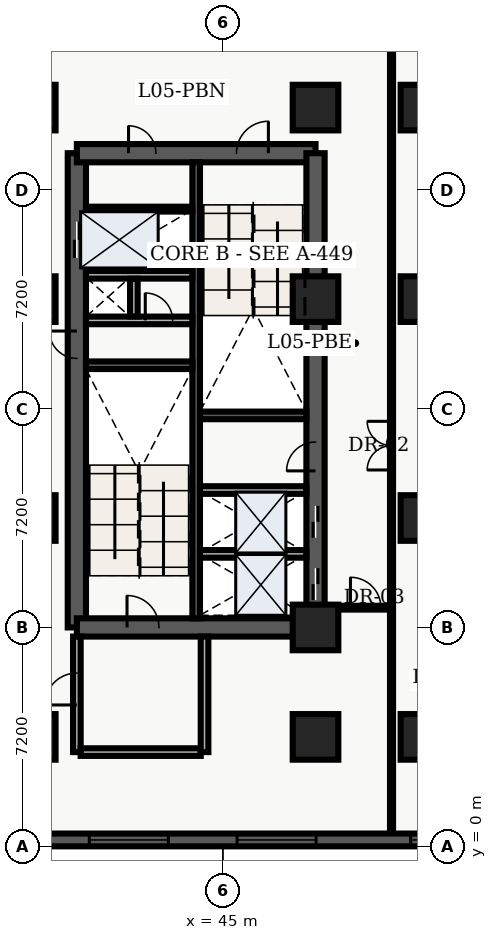
"""IFC4 building model, lengths in metres.
Left out: names, types, materials, properties, quantities, classifications, styles, units other than length and angle.
Written with IfcOpenShell. Run it as: python <this file> out.ifc"""

import sys

from ifc_helpers import new_model, entity, si_unit, converted_unit, direction, frame, origin_with_axes, origin_2d_with_axis, place, context, subcontext, project, spatial, polyline, rectangle, outline, extrude, element, fill, save


model = new_model("IFC4")
c1 = context("Model", 3, precision=1e-05, world=origin_with_axes(), true_north=direction((0.0, 1.0)))
c2 = subcontext(c1, "Body", "Model", "MODEL_VIEW")
j1 = project(units=[si_unit("LENGTHUNIT", "METRE"), converted_unit("PLANEANGLEUNIT", "DEGREE", entity("IfcPlaneAngleMeasure", 0.017), si_unit("PLANEANGLEUNIT", "RADIAN"), dimensions=[0, 0, 0, 0, 0, 0, 0])], contexts=[c1])
p1 = place(None, origin_with_axes())
s1 = spatial("IfcSite", under=j1, at=p1, CompositionType="ELEMENT")
p2 = place(p1, origin_with_axes())
s2 = spatial("IfcBuilding", under=s1, at=p2, CompositionType="ELEMENT")
p3 = place(p2, frame((0.0, 0.0, 24.3), z_axis=(0.0, 0.0, 1.0), x_axis=(1.0, 0.0, 0.0)))
s3 = spatial("IfcBuildingStorey", under=s2, at=p3, CompositionType="ELEMENT", Elevation=24.3)
p4 = place(p3, frame((40.2, 7.2, 0.0), z_axis=(0.0, 0.0, 1.0), x_axis=(0.0, 1.0, 0.0)))
e1 = element("IfcWall", 1, at=p4, inside=s3, PredefinedType="SHEAR", context=c2, shape_type="SweptSolid", body=[
    extrude(outline(polyline([(0.0, -0.3), (15.6, -0.3), (15.6, 0.3), (0.0, 0.3), (0.0, -0.3)])), origin_with_axes(), (0.0, 0.0, 1.0), 4.2),
])
p5 = place(p4, frame((12.75, 0.0, 0.0), z_axis=(0.0, 0.0, 1.0), x_axis=(1.0, 0.0, 0.0)))
e2 = element("IfcOpeningElement", 2, at=p5, cuts=e1, PredefinedType="OPENING", context=c2, shape_type="SweptSolid", body=[
    extrude(rectangle(XDim=1.2, YDim=0.62, at=origin_2d_with_axis()), origin_with_axes(), (0.0, 0.0, 1.0), 2.15),
])
p6 = place(p4, frame((9.3, 0.0, 0.0), z_axis=(0.0, 0.0, 1.0), x_axis=(1.0, 0.0, 0.0)))
e3 = element("IfcOpeningElement", 3, at=p6, cuts=e1, PredefinedType="OPENING", context=c2, shape_type="SweptSolid", body=[
    extrude(rectangle(XDim=0.9, YDim=0.62, at=origin_2d_with_axis()), origin_with_axes(), (0.0, 0.0, 1.0), 2.15),
])
p7 = place(p3, frame((40.2, 7.2, 0.0), z_axis=(0.0, 0.0, 1.0), x_axis=(1.0, 0.0, 0.0)))
e4 = element("IfcWall", 4, at=p7, inside=s3, PredefinedType="SHEAR", context=c2, shape_type="SweptSolid", body=[
    extrude(outline(polyline([(0.0, -0.3), (7.85, -0.3), (7.85, 0.3), (0.0, 0.3), (0.0, -0.3)])), origin_with_axes(), (0.0, 0.0, 1.0), 4.2),
])
p8 = place(p7, frame((2.175, 0.0, 0.0), z_axis=(0.0, 0.0, 1.0), x_axis=(1.0, 0.0, 0.0)))
e5 = element("IfcOpeningElement", 5, at=p8, cuts=e4, PredefinedType="OPENING", context=c2, shape_type="SweptSolid", body=[
    extrude(rectangle(XDim=1.05, YDim=0.62, at=origin_2d_with_axis()), origin_with_axes(), (0.0, 0.0, 1.0), 2.15),
])
p9 = place(p3, frame((40.2, 22.8, 0.0), z_axis=(0.0, 0.0, 1.0), x_axis=(1.0, 0.0, 0.0)))
e6 = element("IfcWall", 6, at=p9, inside=s3, PredefinedType="SHEAR", context=c2, shape_type="SweptSolid", body=[
    extrude(outline(polyline([(0.0, -0.3), (7.85, -0.3), (7.85, 0.3), (0.0, 0.3), (0.0, -0.3)])), origin_with_axes(), (0.0, 0.0, 1.0), 4.2),
])
p10 = place(p9, frame((5.775, 0.0, 0.0), z_axis=(0.0, 0.0, 1.0), x_axis=(1.0, 0.0, 0.0)))
e7 = element("IfcOpeningElement", 7, at=p10, cuts=e6, PredefinedType="OPENING", context=c2, shape_type="SweptSolid", body=[
    extrude(rectangle(XDim=1.05, YDim=0.62, at=origin_2d_with_axis()), origin_with_axes(), (0.0, 0.0, 1.0), 2.15),
])
p11 = place(p9, frame((2.15, 0.0, 0.0), z_axis=(0.0, 0.0, 1.0), x_axis=(1.0, 0.0, 0.0)))
e8 = element("IfcOpeningElement", 8, at=p11, cuts=e6, PredefinedType="OPENING", context=c2, shape_type="SweptSolid", body=[
    extrude(rectangle(XDim=0.9, YDim=0.62, at=origin_2d_with_axis()), origin_with_axes(), (0.0, 0.0, 1.0), 2.15),
])
p12 = place(p3, frame((48.05, 7.2, 0.0), z_axis=(0.0, 0.0, 1.0), x_axis=(0.0, 1.0, 0.0)))
e9 = element("IfcWall", 9, at=p12, inside=s3, PredefinedType="SHEAR", context=c2, shape_type="SweptSolid", body=[
    extrude(outline(polyline([(0.0, -0.3), (15.6, -0.3), (15.6, 0.3), (0.0, 0.3), (0.0, -0.3)])), origin_with_axes(), (0.0, 0.0, 1.0), 4.2),
])
p13 = place(p12, frame((1.425, 0.0, 0.0), z_axis=(0.0, 0.0, 1.0), x_axis=(1.0, 0.0, 0.0)))
e10 = element("IfcOpeningElement", 10, at=p13, cuts=e9, PredefinedType="OPENING", context=c2, shape_type="SweptSolid", body=[
    extrude(rectangle(XDim=1.05, YDim=0.62, at=origin_2d_with_axis()), origin_with_axes(), (0.0, 0.0, 1.0), 2.15),
])
p14 = place(p12, frame((3.475, 0.0, 0.0), z_axis=(0.0, 0.0, 1.0), x_axis=(1.0, 0.0, 0.0)))
e11 = element("IfcOpeningElement", 11, at=p14, cuts=e9, PredefinedType="OPENING", context=c2, shape_type="SweptSolid", body=[
    extrude(rectangle(XDim=1.05, YDim=0.62, at=origin_2d_with_axis()), origin_with_axes(), (0.0, 0.0, 1.0), 2.15),
])
p15 = place(p12, frame((5.625, 0.0, 0.0), z_axis=(0.0, 0.0, 1.0), x_axis=(1.0, 0.0, 0.0)))
e12 = element("IfcOpeningElement", 12, at=p15, cuts=e9, PredefinedType="OPENING", context=c2, shape_type="SweptSolid", body=[
    extrude(rectangle(XDim=0.95, YDim=0.62, at=origin_2d_with_axis()), origin_with_axes(), (0.0, 0.0, 1.0), 2.15),
])
p16 = place(p3, frame((44.125, 7.5, 0.0), z_axis=(0.0, 0.0, 1.0), x_axis=(0.0, 1.0, 0.0)))
e13 = element("IfcWall", 13, at=p16, inside=s3, PredefinedType="SHEAR", context=c2, shape_type="SweptSolid", body=[
    extrude(outline(polyline([(0.0, -0.125), (15.0, -0.125), (15.0, 0.125), (0.0, 0.125), (0.0, -0.125)])), origin_with_axes(), (0.0, 0.0, 1.0), 4.2),
])
for number, where, z_axis, x_axis in (
    (14, (40.5, 15.825, 0.0), (0.0, 0.0, 1.0), (1.0, 0.0, 0.0)),
    (15, (44.25, 14.175, 0.0), (0.0, 0.0, 1.0), (1.0, 0.0, 0.0)),
):
    element("IfcWall", number, at=place(p3, frame(where, z_axis=z_axis, x_axis=x_axis)), inside=s3, PredefinedType="SHEAR", context=c2, shape_type="SweptSolid", body=[
        extrude(outline(polyline([(0.0, -0.125), (3.5, -0.125), (3.5, 0.125), (0.0, 0.125), (0.0, -0.125)])), origin_with_axes(), (0.0, 0.0, 1.0), 4.2),
    ])
p17 = place(p3, frame((40.5, 17.3, 0.0), z_axis=(0.0, 0.0, 1.0), x_axis=(1.0, 0.0, 0.0)))
e16 = element("IfcWall", 16, at=p17, inside=s3, PredefinedType="SOLIDWALL", context=c2, shape_type="SweptSolid", body=[
    extrude(outline(polyline([(0.0, -0.125), (3.5, -0.125), (3.5, 0.125), (0.0, 0.125), (0.0, -0.125)])), origin_with_axes(), (0.0, 0.0, 1.0), 3.24),
])
p18 = place(p17, frame((2.4, 0.0, 0.0), z_axis=(0.0, 0.0, 1.0), x_axis=(1.0, 0.0, 0.0)))
e17 = element("IfcOpeningElement", 17, at=p18, cuts=e16, PredefinedType="OPENING", context=c2, shape_type="SweptSolid", body=[
    extrude(rectangle(XDim=0.9, YDim=0.27, at=origin_2d_with_axis()), origin_with_axes(), (0.0, 0.0, 1.0), 2.15),
])
p19 = place(p3, frame((40.5, 18.8, 0.0), z_axis=(0.0, 0.0, 1.0), x_axis=(1.0, 0.0, 0.0)))
e18 = element("IfcWall", 18, at=p19, inside=s3, PredefinedType="SOLIDWALL", context=c2, shape_type="SweptSolid", body=[
    extrude(outline(polyline([(0.0, -0.125), (3.5, -0.125), (3.5, 0.125), (0.0, 0.125), (0.0, -0.125)])), origin_with_axes(), (0.0, 0.0, 1.0), 3.24),
])
p20 = place(p3, frame((42.075, 17.43, 0.0), z_axis=(0.0, 0.0, 1.0), x_axis=(0.0, 1.0, 0.0)))
e19 = element("IfcWall", 19, at=p20, inside=s3, PredefinedType="SOLIDWALL", context=c2, shape_type="SweptSolid", body=[
    extrude(outline(polyline([(0.0, -0.125), (1.24, -0.125), (1.24, 0.125), (0.0, 0.125), (0.0, -0.125)])), origin_with_axes(), (0.0, 0.0, 1.0), 3.24),
])
p21 = place(p3, frame((40.2, 3.1, 0.0), z_axis=(0.0, 0.0, 1.0), x_axis=(0.0, 1.0, 0.0)))
e20 = element("IfcWall", 20, at=p21, inside=s3, PredefinedType="SOLIDWALL", context=c2, shape_type="SweptSolid", body=[
    extrude(outline(polyline([(0.0, -0.125), (3.8, -0.125), (3.8, 0.125), (0.0, 0.125), (0.0, -0.125)])), origin_with_axes(), (0.0, 0.0, 1.0), 3.24),
])
p22 = place(p21, frame((2.075, 0.0, 0.0), z_axis=(0.0, 0.0, 1.0), x_axis=(1.0, 0.0, 0.0)))
e21 = element("IfcOpeningElement", 21, at=p22, cuts=e20, PredefinedType="OPENING", context=c2, shape_type="SweptSolid", body=[
    extrude(rectangle(XDim=1.05, YDim=0.27, at=origin_2d_with_axis()), origin_with_axes(), (0.0, 0.0, 1.0), 2.15),
])
p23 = place(p3, frame((40.325, 3.1, 0.0), z_axis=(0.0, 0.0, 1.0), x_axis=(1.0, 0.0, 0.0)))
e22 = element("IfcWall", 22, at=p23, inside=s3, PredefinedType="SOLIDWALL", context=c2, shape_type="SweptSolid", body=[
    extrude(outline(polyline([(0.0, -0.125), (3.95, -0.125), (3.95, 0.125), (0.0, 0.125), (0.0, -0.125)])), origin_with_axes(), (0.0, 0.0, 1.0), 3.24),
])
p24 = place(p3, frame((44.4, 3.1, 0.0), z_axis=(0.0, 0.0, 1.0), x_axis=(0.0, 1.0, 0.0)))
e23 = element("IfcWall", 23, at=p24, inside=s3, PredefinedType="SOLIDWALL", context=c2, shape_type="SweptSolid", body=[
    extrude(outline(polyline([(0.0, -0.125), (3.8, -0.125), (3.8, 0.125), (0.0, 0.125), (0.0, -0.125)])), origin_with_axes(), (0.0, 0.0, 1.0), 3.24),
])
for number, where, z_axis, x_axis in (
    (24, (38.75, 3.6, 0.0), (0.0, 0.0, 1.0), (1.0, 0.0, 0.0)),
    (25, (38.75, 10.8, 0.0), (0.0, 0.0, 1.0), (1.0, 0.0, 0.0)),
    (26, (38.75, 18.0, 0.0), (0.0, 0.0, 1.0), (1.0, 0.0, 0.0)),
    (27, (38.75, 24.3, 0.0), (0.0, 0.0, 1.0), (1.0, 0.0, 0.0)),
    (28, (48.05, 3.6, 0.0), (0.0, 0.0, 1.0), (1.0, 0.0, 0.0)),
    (29, (48.05, 7.2, 0.0), (0.0, 0.0, 1.0), (1.0, 0.0, 0.0)),
    (30, (48.05, 18.0, 0.0), (0.0, 0.0, 1.0), (1.0, 0.0, 0.0)),
    (31, (48.05, 24.3, 0.0), (0.0, 0.0, 1.0), (1.0, 0.0, 0.0)),
    (32, (51.6, 3.6, 0.0), (0.0, 0.0, 1.0), (1.0, 0.0, 0.0)),
    (33, (51.6, 10.8, 0.0), (0.0, 0.0, 1.0), (1.0, 0.0, 0.0)),
    (34, (51.6, 18.0, 0.0), (0.0, 0.0, 1.0), (1.0, 0.0, 0.0)),
    (35, (51.6, 24.3, 0.0), (0.0, 0.0, 1.0), (1.0, 0.0, 0.0)),
):
    element("IfcColumn", number, at=place(p3, frame(where, z_axis=z_axis, x_axis=x_axis)), inside=s3, PredefinedType="COLUMN", context=c2, shape_type="SweptSolid", body=[
        extrude(rectangle(XDim=1.5, YDim=1.5, at=origin_2d_with_axis()), origin_with_axes(), (0.0, 0.0, 1.0), 4.5),
    ])
p25 = place(p3, frame((40.5, 20.96, 0.0), z_axis=(0.0, 0.0, 1.0), x_axis=(1.0, 0.0, 0.0)))
e36 = element("IfcWall", 36, at=p25, inside=s3, PredefinedType="PARTITIONING", context=c2, shape_type="SweptSolid", body=[
    extrude(outline(polyline([(0.0, -0.08), (3.5, -0.08), (3.5, 0.08), (0.0, 0.08), (0.0, -0.08)])), origin_with_axes(), (0.0, 0.0, 1.0), 3.2),
])
for number, where, z_axis, x_axis in (
    (37, (44.25, 9.62, 0.0), (0.0, 0.0, 1.0), (1.0, 0.0, 0.0)),
    (38, (44.25, 11.72, 0.0), (0.0, 0.0, 1.0), (1.0, 0.0, 0.0)),
):
    element("IfcWall", number, at=place(p3, frame(where, z_axis=z_axis, x_axis=x_axis)), inside=s3, PredefinedType="SOLIDWALL", context=c2, shape_type="SweptSolid", body=[
        extrude(outline(polyline([(0.0, -0.125), (3.5, -0.125), (3.5, 0.125), (0.0, 0.125), (0.0, -0.125)])), origin_with_axes(), (0.0, 0.0, 1.0), 3.2),
    ])
p26 = place(p3, frame((50.55, 0.38, 0.0), z_axis=(0.0, 0.0, 1.0), x_axis=(0.0, 1.0, 0.0)))
e39 = element("IfcWall", 39, at=p26, inside=s3, PredefinedType="PARTITIONING", context=c2, shape_type="SweptSolid", body=[
    extrude(outline(polyline([(0.0, -0.05), (35.24, -0.05), (35.24, 0.05), (0.0, 0.05), (0.0, -0.05)])), origin_with_axes(), (0.0, 0.0, 1.0), 3.2),
])
p27 = place(p26, frame((12.8, 0.0, 0.0), z_axis=(0.0, 0.0, 1.0), x_axis=(1.0, 0.0, 0.0)))
e40 = element("IfcOpeningElement", 40, at=p27, cuts=e39, PredefinedType="OPENING", context=c2, shape_type="SweptSolid", body=[
    extrude(rectangle(XDim=1.6, YDim=0.12, at=origin_2d_with_axis()), origin_with_axes(), (0.0, 0.0, 1.0), 2.2),
])
p28 = place(p26, frame((27.8, 0.0, 0.0), z_axis=(0.0, 0.0, 1.0), x_axis=(1.0, 0.0, 0.0)))
e41 = element("IfcOpeningElement", 41, at=p28, cuts=e39, PredefinedType="OPENING", context=c2, shape_type="SweptSolid", body=[
    extrude(rectangle(XDim=1.6, YDim=0.12, at=origin_2d_with_axis()), origin_with_axes(), (0.0, 0.0, 1.0), 2.2),
])
p29 = place(p3, frame((48.05, 7.85, 0.0), z_axis=(0.0, 0.0, 1.0), x_axis=(1.0, 0.0, 0.0)))
e42 = element("IfcWall", 42, at=p29, inside=s3, PredefinedType="PARTITIONING", context=c2, shape_type="SweptSolid", body=[
    extrude(outline(polyline([(0.0, -0.062), (2.5, -0.062), (2.5, 0.062), (0.0, 0.062), (0.0, -0.062)])), origin_with_axes(), (0.0, 0.0, 1.0), 3.2),
])
p30 = place(p29, frame((1.65, 0.0, 0.0), z_axis=(0.0, 0.0, 1.0), x_axis=(1.0, 0.0, 0.0)))
e43 = element("IfcOpeningElement", 43, at=p30, cuts=e42, PredefinedType="OPENING", context=c2, shape_type="SweptSolid", body=[
    extrude(rectangle(XDim=1.0, YDim=0.145, at=origin_2d_with_axis()), origin_with_axes(), (0.0, 0.0, 1.0), 2.15),
])
p31 = place(p3, frame((64.38, 0.21, 0.0), z_axis=(0.0, 0.0, 1.0), x_axis=(-1.0, 0.0, 0.0)))
e44 = element("IfcWall", 44, at=p31, inside=s3, PredefinedType="SOLIDWALL", context=c2, shape_type="SweptSolid", body=[
    extrude(outline(polyline([(0.0, -0.21), (64.38, -0.21), (64.38, 0.21), (0.0, 0.21), (0.0, -0.21)])), origin_with_axes(), (0.0, 0.0, 1.0), 4.2),
])
p32 = place(p31, frame((3.03, 0.0, 0.45), z_axis=(0.0, 0.0, 1.0), x_axis=(1.0, 0.0, 0.0)))
e45 = element("IfcOpeningElement", 45, at=p32, cuts=e44, PredefinedType="OPENING", context=c2, shape_type="SweptSolid", body=[
    extrude(rectangle(XDim=2.6, YDim=0.44, at=origin_2d_with_axis()), origin_with_axes(), (0.0, 0.0, 1.0), 2.8),
])
p33 = place(p31, frame((7.89, 0.0, 0.45), z_axis=(0.0, 0.0, 1.0), x_axis=(1.0, 0.0, 0.0)))
e46 = element("IfcOpeningElement", 46, at=p33, cuts=e44, PredefinedType="OPENING", context=c2, shape_type="SweptSolid", body=[
    extrude(rectangle(XDim=2.6, YDim=0.44, at=origin_2d_with_axis()), origin_with_axes(), (0.0, 0.0, 1.0), 2.8),
])
p34 = place(p31, frame((11.9, 0.0, 0.45), z_axis=(0.0, 0.0, 1.0), x_axis=(1.0, 0.0, 0.0)))
e47 = element("IfcOpeningElement", 47, at=p34, cuts=e44, PredefinedType="OPENING", context=c2, shape_type="SweptSolid", body=[
    extrude(rectangle(XDim=2.6, YDim=0.44, at=origin_2d_with_axis()), origin_with_axes(), (0.0, 0.0, 1.0), 2.8),
])
p35 = place(p31, frame((17.61, 0.0, 0.45), z_axis=(0.0, 0.0, 1.0), x_axis=(1.0, 0.0, 0.0)))
e48 = element("IfcOpeningElement", 48, at=p35, cuts=e44, PredefinedType="OPENING", context=c2, shape_type="SweptSolid", body=[
    extrude(rectangle(XDim=2.6, YDim=0.44, at=origin_2d_with_axis()), origin_with_axes(), (0.0, 0.0, 1.0), 2.8),
])
p36 = place(p31, frame((22.47, 0.0, 0.45), z_axis=(0.0, 0.0, 1.0), x_axis=(1.0, 0.0, 0.0)))
e49 = element("IfcOpeningElement", 49, at=p36, cuts=e44, PredefinedType="OPENING", context=c2, shape_type="SweptSolid", body=[
    extrude(rectangle(XDim=2.6, YDim=0.44, at=origin_2d_with_axis()), origin_with_axes(), (0.0, 0.0, 1.0), 2.8),
])
p37 = place(p31, frame((27.33, 0.0, 0.45), z_axis=(0.0, 0.0, 1.0), x_axis=(1.0, 0.0, 0.0)))
e50 = element("IfcOpeningElement", 50, at=p37, cuts=e44, PredefinedType="OPENING", context=c2, shape_type="SweptSolid", body=[
    extrude(rectangle(XDim=2.6, YDim=0.44, at=origin_2d_with_axis()), origin_with_axes(), (0.0, 0.0, 1.0), 2.8),
])
p38 = place(p31, frame((32.19, 0.0, 0.45), z_axis=(0.0, 0.0, 1.0), x_axis=(1.0, 0.0, 0.0)))
e51 = element("IfcOpeningElement", 51, at=p38, cuts=e44, PredefinedType="OPENING", context=c2, shape_type="SweptSolid", body=[
    extrude(rectangle(XDim=2.6, YDim=0.44, at=origin_2d_with_axis()), origin_with_axes(), (0.0, 0.0, 1.0), 2.8),
])
p39 = place(p31, frame((37.05, 0.0, 0.45), z_axis=(0.0, 0.0, 1.0), x_axis=(1.0, 0.0, 0.0)))
e52 = element("IfcOpeningElement", 52, at=p39, cuts=e44, PredefinedType="OPENING", context=c2, shape_type="SweptSolid", body=[
    extrude(rectangle(XDim=2.6, YDim=0.44, at=origin_2d_with_axis()), origin_with_axes(), (0.0, 0.0, 1.0), 2.8),
])
p40 = place(p31, frame((41.06, 0.0, 0.45), z_axis=(0.0, 0.0, 1.0), x_axis=(1.0, 0.0, 0.0)))
e53 = element("IfcOpeningElement", 53, at=p40, cuts=e44, PredefinedType="OPENING", context=c2, shape_type="SweptSolid", body=[
    extrude(rectangle(XDim=2.6, YDim=0.44, at=origin_2d_with_axis()), origin_with_axes(), (0.0, 0.0, 1.0), 2.8),
])
p41 = place(p31, frame((46.77, 0.0, 0.45), z_axis=(0.0, 0.0, 1.0), x_axis=(1.0, 0.0, 0.0)))
e54 = element("IfcOpeningElement", 54, at=p41, cuts=e44, PredefinedType="OPENING", context=c2, shape_type="SweptSolid", body=[
    extrude(rectangle(XDim=2.6, YDim=0.44, at=origin_2d_with_axis()), origin_with_axes(), (0.0, 0.0, 1.0), 2.8),
])
p42 = place(p31, frame((50.78, 0.0, 0.45), z_axis=(0.0, 0.0, 1.0), x_axis=(1.0, 0.0, 0.0)))
e55 = element("IfcOpeningElement", 55, at=p42, cuts=e44, PredefinedType="OPENING", context=c2, shape_type="SweptSolid", body=[
    extrude(rectangle(XDim=2.6, YDim=0.44, at=origin_2d_with_axis()), origin_with_axes(), (0.0, 0.0, 1.0), 2.8),
])
p43 = place(p31, frame((56.49, 0.0, 0.45), z_axis=(0.0, 0.0, 1.0), x_axis=(1.0, 0.0, 0.0)))
e56 = element("IfcOpeningElement", 56, at=p43, cuts=e44, PredefinedType="OPENING", context=c2, shape_type="SweptSolid", body=[
    extrude(rectangle(XDim=2.6, YDim=0.44, at=origin_2d_with_axis()), origin_with_axes(), (0.0, 0.0, 1.0), 2.8),
])
p44 = place(p31, frame((61.35, 0.0, 0.45), z_axis=(0.0, 0.0, 1.0), x_axis=(1.0, 0.0, 0.0)))
e57 = element("IfcOpeningElement", 57, at=p44, cuts=e44, PredefinedType="OPENING", context=c2, shape_type="SweptSolid", body=[
    extrude(rectangle(XDim=2.6, YDim=0.44, at=origin_2d_with_axis()), origin_with_axes(), (0.0, 0.0, 1.0), 2.8),
])
p45 = place(p12, frame((1.425, 0.0, 0.0), z_axis=(0.0, 0.0, 1.0), x_axis=(1.0, 0.0, 0.0)))
e58 = element("IfcDoor", 58, at=p45, inside=s3, OperationType="SLIDING_TO_LEFT", PredefinedType="DOOR", context=c2, shape_type="SweptSolid", body=[
    extrude(rectangle(XDim=1.05, YDim=0.09, at=origin_2d_with_axis()), origin_with_axes(), (0.0, 0.0, 1.0), 2.15),
])
fill(e10, e58)
p46 = place(p12, frame((3.475, 0.0, 0.0), z_axis=(0.0, 0.0, 1.0), x_axis=(1.0, 0.0, 0.0)))
e59 = element("IfcDoor", 59, at=p46, inside=s3, OperationType="SLIDING_TO_RIGHT", PredefinedType="DOOR", context=c2, shape_type="SweptSolid", body=[
    extrude(rectangle(XDim=1.05, YDim=0.09, at=origin_2d_with_axis()), origin_with_axes(), (0.0, 0.0, 1.0), 2.15),
])
fill(e11, e59)
p47 = place(p4, frame((12.75, 0.0, 0.0), z_axis=(0.0, 0.0, 1.0), x_axis=(1.0, 0.0, 0.0)))
e60 = element("IfcDoor", 60, at=p47, inside=s3, OperationType="DOUBLE_DOOR_SLIDING", PredefinedType="DOOR", context=c2, shape_type="SweptSolid", body=[
    extrude(rectangle(XDim=1.2, YDim=0.09, at=origin_2d_with_axis()), origin_with_axes(), (0.0, 0.0, 1.0), 2.15),
])
fill(e2, e60)
p48 = place(p4, frame((9.3, 0.0, 0.0), z_axis=(0.0, 0.0, 1.0), x_axis=(1.0, 0.0, 0.0)))
e61 = element("IfcDoor", 61, at=p48, inside=s3, OperationType="SINGLE_SWING_RIGHT", PredefinedType="DOOR", context=c2, shape_type="SweptSolid", body=[
    extrude(rectangle(XDim=0.9, YDim=0.09, at=origin_2d_with_axis()), origin_with_axes(), (0.0, 0.0, 1.0), 2.15),
])
fill(e3, e61)
p49 = place(p17, frame((2.4, 0.0, 0.0), z_axis=(0.0, 0.0, 1.0), x_axis=(1.0, 0.0, 0.0)))
e62 = element("IfcDoor", 62, at=p49, inside=s3, OperationType="SINGLE_SWING_LEFT", PredefinedType="DOOR", context=c2, shape_type="SweptSolid", body=[
    extrude(rectangle(XDim=0.9, YDim=0.09, at=origin_2d_with_axis()), origin_with_axes(), (0.0, 0.0, 1.0), 2.15),
])
fill(e17, e62)
p50 = place(p7, frame((2.175, 0.0, 0.0), z_axis=(0.0, 0.0, 1.0), x_axis=(1.0, 0.0, 0.0)))
e63 = element("IfcDoor", 63, at=p50, inside=s3, OperationType="SINGLE_SWING_LEFT", PredefinedType="DOOR", context=c2, shape_type="SweptSolid", body=[
    extrude(rectangle(XDim=1.05, YDim=0.09, at=origin_2d_with_axis()), origin_with_axes(), (0.0, 0.0, 1.0), 2.15),
])
fill(e5, e63)
p51 = place(p9, frame((5.775, 0.0, 0.0), z_axis=(0.0, 0.0, 1.0), x_axis=(1.0, 0.0, 0.0)))
e64 = element("IfcDoor", 64, at=p51, inside=s3, OperationType="SINGLE_SWING_RIGHT", PredefinedType="DOOR", context=c2, shape_type="SweptSolid", body=[
    extrude(rectangle(XDim=1.05, YDim=0.09, at=origin_2d_with_axis()), origin_with_axes(), (0.0, 0.0, 1.0), 2.15),
])
fill(e7, e64)
p52 = place(p21, frame((2.075, 0.0, 0.0), z_axis=(0.0, 0.0, 1.0), x_axis=(1.0, 0.0, 0.0)))
e65 = element("IfcDoor", 65, at=p52, inside=s3, OperationType="SINGLE_SWING_LEFT", PredefinedType="DOOR", context=c2, shape_type="SweptSolid", body=[
    extrude(rectangle(XDim=1.05, YDim=0.09, at=origin_2d_with_axis()), origin_with_axes(), (0.0, 0.0, 1.0), 2.15),
])
fill(e21, e65)
p53 = place(p9, frame((2.15, 0.0, 0.0), z_axis=(0.0, 0.0, 1.0), x_axis=(1.0, 0.0, 0.0)))
e66 = element("IfcDoor", 66, at=p53, inside=s3, OperationType="SINGLE_SWING_LEFT", PredefinedType="DOOR", context=c2, shape_type="SweptSolid", body=[
    extrude(rectangle(XDim=0.9, YDim=0.09, at=origin_2d_with_axis()), origin_with_axes(), (0.0, 0.0, 1.0), 2.15),
])
fill(e8, e66)
p54 = place(p12, frame((5.625, 0.0, 0.0), z_axis=(0.0, 0.0, 1.0), x_axis=(1.0, 0.0, 0.0)))
e67 = element("IfcDoor", 67, at=p54, inside=s3, OperationType="SINGLE_SWING_LEFT", PredefinedType="DOOR", context=c2, shape_type="SweptSolid", body=[
    extrude(rectangle(XDim=0.95, YDim=0.09, at=origin_2d_with_axis()), origin_with_axes(), (0.0, 0.0, 1.0), 2.15),
])
fill(e12, e67)
p55 = place(p29, frame((1.65, 0.0, 0.0), z_axis=(0.0, 0.0, 1.0), x_axis=(1.0, 0.0, 0.0)))
e68 = element("IfcDoor", 68, at=p55, inside=s3, OperationType="SINGLE_SWING_LEFT", PredefinedType="DOOR", context=c2, shape_type="SweptSolid", body=[
    extrude(rectangle(XDim=1.0, YDim=0.075, at=origin_2d_with_axis()), origin_with_axes(), (0.0, 0.0, 1.0), 2.15),
])
fill(e43, e68)
p56 = place(p26, frame((12.8, 0.0, 0.0), z_axis=(0.0, 0.0, 1.0), x_axis=(1.0, 0.0, 0.0)))
e69 = element("IfcDoor", 69, at=p56, inside=s3, OperationType="DOUBLE_DOOR_SINGLE_SWING", PredefinedType="DOOR", context=c2, shape_type="SweptSolid", body=[
    extrude(rectangle(XDim=1.6, YDim=0.06, at=origin_2d_with_axis()), origin_with_axes(), (0.0, 0.0, 1.0), 2.2),
])
fill(e40, e69)
p57 = place(p31, frame((11.9, 0.0, 0.45), z_axis=(0.0, 0.0, 1.0), x_axis=(1.0, 0.0, 0.0)))
e70 = element("IfcWindow", 70, at=p57, inside=s3, PredefinedType="WINDOW", context=c2, shape_type="SweptSolid", body=[
    extrude(rectangle(XDim=2.6, YDim=0.09, at=origin_2d_with_axis()), origin_with_axes(), (0.0, 0.0, 1.0), 2.8),
])
fill(e47, e70)
p58 = place(p31, frame((17.61, 0.0, 0.45), z_axis=(0.0, 0.0, 1.0), x_axis=(1.0, 0.0, 0.0)))
e71 = element("IfcWindow", 71, at=p58, inside=s3, PredefinedType="WINDOW", context=c2, shape_type="SweptSolid", body=[
    extrude(rectangle(XDim=2.6, YDim=0.09, at=origin_2d_with_axis()), origin_with_axes(), (0.0, 0.0, 1.0), 2.8),
])
fill(e48, e71)
p59 = place(p31, frame((22.47, 0.0, 0.45), z_axis=(0.0, 0.0, 1.0), x_axis=(1.0, 0.0, 0.0)))
e72 = element("IfcWindow", 72, at=p59, inside=s3, PredefinedType="WINDOW", context=c2, shape_type="SweptSolid", body=[
    extrude(rectangle(XDim=2.6, YDim=0.09, at=origin_2d_with_axis()), origin_with_axes(), (0.0, 0.0, 1.0), 2.8),
])
fill(e49, e72)
save(model, sys.argv[1])
